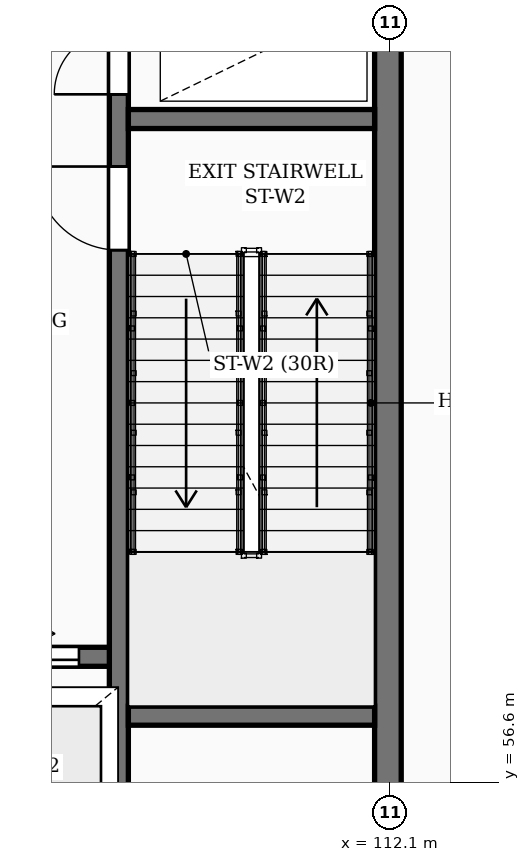
"""IFC4 building model, lengths in metres.
Left out: names, types, materials, properties, quantities, classifications, styles, units other than length and angle.
Written with IfcOpenShell. Run it as: python <this file> out.ifc"""

import sys

from ifc_helpers import new_model, si_unit, direction, frame, frame_2d, origin, place, context, subcontext, project, spatial, rectangle, extrude, element, fill, save


model = new_model("IFC4")
c1 = context("Model", 3, precision=1e-05, world=origin(), true_north=direction((0.0, 1.0)))
c2 = subcontext(c1, "Body", "Model", "MODEL_VIEW")
j1 = project(units=[si_unit("LENGTHUNIT", "METRE"), si_unit("PLANEANGLEUNIT", "RADIAN")], contexts=[c1])
p1 = place(None, origin())
s1 = spatial("IfcSite", under=j1, at=p1, CompositionType="ELEMENT")
p2 = place(p1, origin())
s2 = spatial("IfcBuilding", under=s1, at=p2, CompositionType="ELEMENT")
p3 = place(p2, origin())
s3 = spatial("IfcBuildingStorey", under=s2, at=p3, CompositionType="ELEMENT", Elevation=0.0)
p4 = place(p3, frame((112.075, 55.375, 0.0), z_axis=(0.0, 0.0, 1.0), x_axis=(0.0, 1.0, 0.0)))
e1 = element("IfcWall", 1, at=p4, inside=s3, PredefinedType="SHEAR", context=c2, shape_type="SweptSolid", body=[
    extrude(rectangle(XDim=11.65, YDim=0.35, at=frame_2d((5.825, 0.0))), origin(), (0.0, 0.0, 1.0), 5.4),
])
p5 = place(p3, frame((106.22, 58.25, 0.0), z_axis=(0.0, 0.0, 1.0), x_axis=(1.0, 0.0, 0.0)))
e2 = element("IfcWall", 2, at=p5, inside=s3, PredefinedType="SHEAR", context=c2, shape_type="SweptSolid", body=[
    extrude(rectangle(XDim=2.46, YDim=0.25, at=frame_2d((1.23, 0.0))), origin(), (0.0, 0.0, 1.0), 5.4),
])
p6 = place(p5, frame((0.67, 0.0, 0.0)))
e3 = element("IfcOpeningElement", 3, at=p6, cuts=e2, PredefinedType="OPENING", context=c2, shape_type="SweptSolid", body=[
    extrude(rectangle(XDim=1.12, YDim=2.12, at=frame_2d((0.56, 1.06))), frame((0.0, 0.135, 0.0), z_axis=(0.0, -1.0, 0.0), x_axis=(1.0, 0.0, 0.0)), (0.0, 0.0, 1.0), 0.27),
])
p7 = place(p3, frame((108.535, 55.4, 0.0), z_axis=(0.0, 0.0, 1.0), x_axis=(0.0, 1.0, 0.0)))
e4 = element("IfcWall", 4, at=p7, inside=s3, PredefinedType="SHEAR", context=c2, shape_type="SweptSolid", body=[
    extrude(rectangle(XDim=11.6, YDim=0.25, at=frame_2d((5.8, 0.0))), origin(), (0.0, 0.0, 1.0), 5.4),
])
p8 = place(p7, frame((8.2, 0.0, 0.0)))
e5 = element("IfcOpeningElement", 5, at=p8, cuts=e4, PredefinedType="OPENING", context=c2, shape_type="SweptSolid", body=[
    extrude(rectangle(XDim=1.1, YDim=2.1, at=frame_2d((0.55, 1.05))), frame((0.0, 0.135, 0.0), z_axis=(0.0, -1.0, 0.0), x_axis=(1.0, 0.0, 0.0)), (0.0, 0.0, 1.0), 0.27),
])
p9 = place(p7, frame((10.25, 0.0, 0.0)))
e6 = element("IfcOpeningElement", 6, at=p9, cuts=e4, PredefinedType="OPENING", context=c2, shape_type="SweptSolid", body=[
    extrude(rectangle(XDim=0.85, YDim=2.05, at=frame_2d((0.425, 1.025))), frame((0.0, 0.135, 0.0), z_axis=(0.0, -1.0, 0.0), x_axis=(1.0, 0.0, 0.0)), (0.0, 0.0, 1.0), 0.27),
])
for number, where, z_axis, x_axis in (
    (7, (108.66, 57.475, 0.0), (0.0, 0.0, 1.0), (1.0, 0.0, 0.0)),
    (8, (108.66, 65.325, 0.0), (0.0, 0.0, 1.0), (1.0, 0.0, 0.0)),
):
    element("IfcWall", number, at=place(p3, frame(where, z_axis=z_axis, x_axis=x_axis)), inside=s3, PredefinedType="SHEAR", context=c2, shape_type="SweptSolid", body=[
        extrude(rectangle(XDim=3.24, YDim=0.25, at=frame_2d((1.62, 0.0))), origin(), (0.0, 0.0, 1.0), 5.4),
    ])
p10 = place(p6, origin())
e9 = element("IfcDoor", 9, at=p10, inside=s3, OperationType="SLIDING_TO_RIGHT", PredefinedType="DOOR", context=c2, shape_type="SweptSolid", body=[
    extrude(rectangle(XDim=1.12, YDim=2.12, at=frame_2d((0.56, 1.06))), frame((0.0, 0.025, 0.0), z_axis=(0.0, -1.0, 0.0), x_axis=(1.0, 0.0, 0.0)), (0.0, 0.0, 1.0), 0.05),
])
fill(e3, e9)
p11 = place(p8, origin())
e10 = element("IfcDoor", 10, at=p11, inside=s3, OperationType="SINGLE_SWING_RIGHT", PredefinedType="DOOR", context=c2, shape_type="SweptSolid", body=[
    extrude(rectangle(XDim=1.1, YDim=2.1, at=frame_2d((0.55, 1.05))), frame((0.0, 0.025, 0.0), z_axis=(0.0, -1.0, 0.0), x_axis=(1.0, 0.0, 0.0)), (0.0, 0.0, 1.0), 0.05),
])
fill(e5, e10)
p12 = place(p9, origin())
e11 = element("IfcDoor", 11, at=p12, inside=s3, OperationType="SINGLE_SWING_LEFT", PredefinedType="DOOR", context=c2, shape_type="SweptSolid", body=[
    extrude(rectangle(XDim=0.85, YDim=2.05, at=frame_2d((0.425, 1.025))), frame((0.0, 0.025, 0.0), z_axis=(0.0, -1.0, 0.0), x_axis=(1.0, 0.0, 0.0)), (0.0, 0.0, 1.0), 0.05),
])
fill(e6, e11)
save(model, sys.argv[1])
